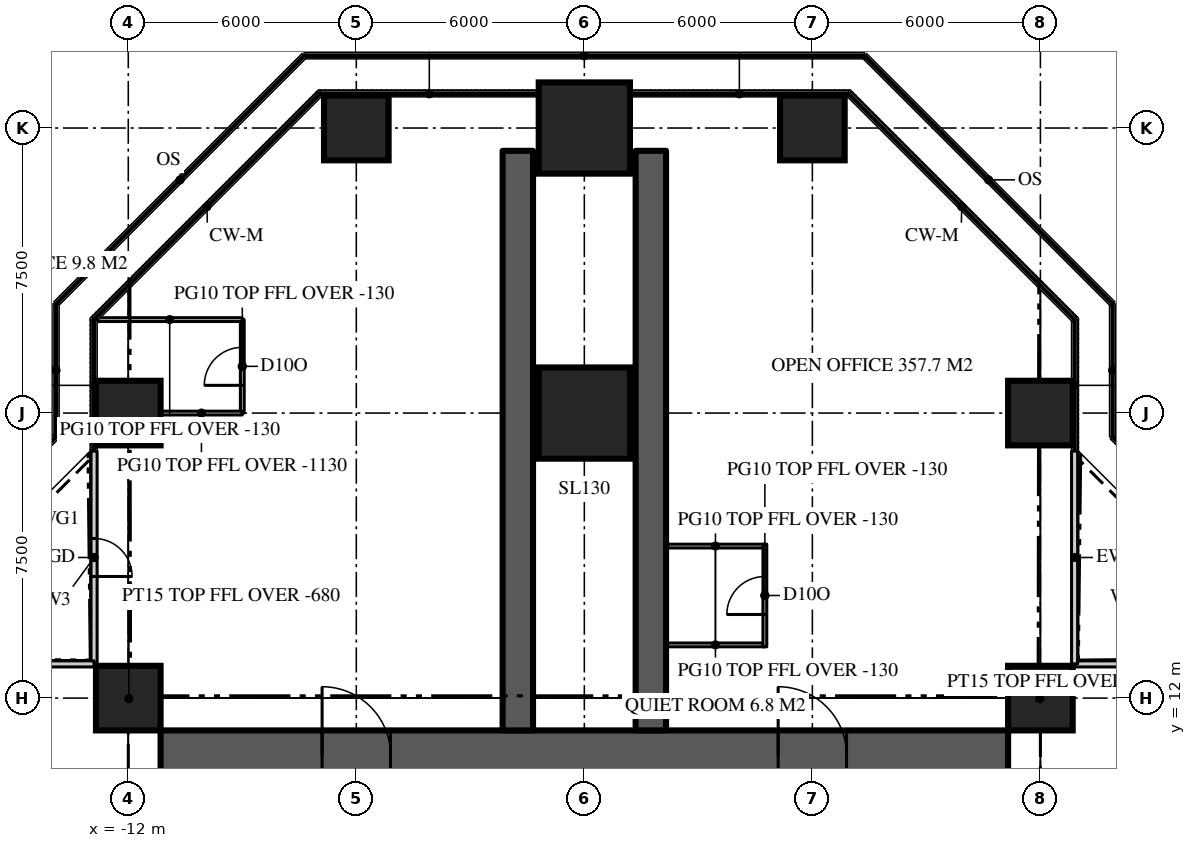
"""IFC4 building model, lengths in metres.
Left out: names, types, materials, properties, quantities, classifications, styles, units other than length and angle.
Written with IfcOpenShell. Run it as: python <this file> out.ifc"""

import sys

from ifc_helpers import new_model, si_unit, direction, frame, frame_2d, origin, origin_2d, place, context, subcontext, project, spatial, rectangle, extrude, element, fill, save


model = new_model("IFC4")
c1 = context("Model", 3, precision=1e-05, world=origin(), true_north=direction((0.0, 1.0)))
c2 = subcontext(c1, "Body", "Model", "MODEL_VIEW")
j1 = project(units=[si_unit("LENGTHUNIT", "METRE"), si_unit("PLANEANGLEUNIT", "RADIAN")], contexts=[c1])
p1 = place(None, origin())
s1 = spatial("IfcSite", under=j1, at=p1, CompositionType="ELEMENT")
p2 = place(p1, origin())
s2 = spatial("IfcBuilding", under=s1, at=p2, CompositionType="ELEMENT")
p3 = place(p2, frame((0.0, 0.0, 155.4)))
s3 = spatial("IfcBuildingStorey", under=s2, at=p3, CompositionType="ELEMENT", Elevation=155.4)
p4 = place(p3, frame((-11.15, 10.5, 0.0), z_axis=(0.0, 0.0, 1.0), x_axis=(1.0, 0.0, 0.0)))
e1 = element("IfcWall", 1, at=p4, inside=s3, PredefinedType="SHEAR", context=c2, shape_type="SweptSolid", body=[
    extrude(rectangle(XDim=22.3, YDim=1.3, at=frame_2d((11.15, 0.0))), origin(), (0.0, 0.0, 1.0), 3.9),
])
p5 = place(p4, frame((4.25, 0.0, 0.0)))
e2 = element("IfcOpeningElement", 2, at=p5, cuts=e1, PredefinedType="OPENING", context=c2, shape_type="SweptSolid", body=[
    extrude(rectangle(XDim=1.8, YDim=2.2, at=frame_2d((0.9, 1.1))), frame((0.0, 0.66, 0.0), z_axis=(0.0, -1.0, 0.0), x_axis=(1.0, 0.0, 0.0)), (0.0, 0.0, 1.0), 1.32),
])
p6 = place(p4, frame((16.25, 0.0, 0.0)))
e3 = element("IfcOpeningElement", 3, at=p6, cuts=e1, PredefinedType="OPENING", context=c2, shape_type="SweptSolid", body=[
    extrude(rectangle(XDim=1.8, YDim=2.2, at=frame_2d((0.9, 1.1))), frame((0.0, 0.66, 0.0), z_axis=(0.0, -1.0, 0.0), x_axis=(1.0, 0.0, 0.0)), (0.0, 0.0, 1.0), 1.32),
])
for number, where, z_axis, x_axis in (
    (4, (1.75, 11.15, 0.0), (0.0, 0.0, 1.0), (0.0, 1.0, 0.0)),
    (5, (-1.75, 11.15, 0.0), (0.0, 0.0, 1.0), (0.0, 1.0, 0.0)),
):
    element("IfcWall", number, at=place(p3, frame(where, z_axis=z_axis, x_axis=x_axis)), inside=s3, PredefinedType="SHEAR", context=c2, shape_type="SweptSolid", body=[
        extrude(rectangle(XDim=15.25, YDim=0.8, at=frame_2d((7.625, 0.0))), origin(), (0.0, 0.0, 1.0), 3.9),
    ])
for number, where, z_axis, x_axis in (
    (6, (-12.0, 12.0, 0.0), (0.0, 0.0, 1.0), (1.0, 0.0, 0.0)),
    (7, (12.0, 12.0, 0.0), (0.0, 0.0, 1.0), (1.0, 0.0, 0.0)),
    (8, (-12.0, 19.5, 0.0), (0.0, 0.0, 1.0), (1.0, 0.0, 0.0)),
):
    element("IfcColumn", number, at=place(p3, frame(where, z_axis=z_axis, x_axis=x_axis)), inside=s3, PredefinedType="COLUMN", context=c2, shape_type="SweptSolid", body=[
        extrude(rectangle(XDim=1.7, YDim=1.7, at=origin_2d()), origin(), (0.0, 0.0, 1.0), 3.9),
    ])
p7 = place(p3, frame((0.0, 19.5, 0.0), z_axis=(0.0, 0.0, 1.0), x_axis=(1.0, 0.0, 0.0)))
e9 = element("IfcColumn", 9, at=p7, inside=s3, PredefinedType="COLUMN", context=c2, shape_type="SweptSolid", body=[
    extrude(rectangle(XDim=2.4, YDim=2.4, at=origin_2d()), origin(), (0.0, 0.0, 1.0), 3.9),
])
for number, where, z_axis, x_axis in (
    (10, (12.0, 19.5, 0.0), (0.0, 0.0, 1.0), (1.0, 0.0, 0.0)),
    (11, (-6.0, 27.0, 0.0), (0.0, 0.0, 1.0), (1.0, 0.0, 0.0)),
):
    element("IfcColumn", number, at=place(p3, frame(where, z_axis=z_axis, x_axis=x_axis)), inside=s3, PredefinedType="COLUMN", context=c2, shape_type="SweptSolid", body=[
        extrude(rectangle(XDim=1.7, YDim=1.7, at=origin_2d()), origin(), (0.0, 0.0, 1.0), 3.9),
    ])
p8 = place(p3, frame((0.0, 27.0, 0.0), z_axis=(0.0, 0.0, 1.0), x_axis=(1.0, 0.0, 0.0)))
e12 = element("IfcColumn", 12, at=p8, inside=s3, PredefinedType="COLUMN", context=c2, shape_type="SweptSolid", body=[
    extrude(rectangle(XDim=2.4, YDim=2.4, at=origin_2d()), origin(), (0.0, 0.0, 1.0), 3.9),
])
p9 = place(p3, frame((6.0, 27.0, 0.0), z_axis=(0.0, 0.0, 1.0), x_axis=(1.0, 0.0, 0.0)))
e13 = element("IfcColumn", 13, at=p9, inside=s3, PredefinedType="COLUMN", context=c2, shape_type="SweptSolid", body=[
    extrude(rectangle(XDim=1.7, YDim=1.7, at=origin_2d()), origin(), (0.0, 0.0, 1.0), 3.9),
])
p10 = place(p3, frame((18.5, 12.9, 0.0), z_axis=(0.0, 0.0, 1.0), x_axis=(-1.0, 0.0, 0.0)))
e14 = element("IfcWall", 14, at=p10, inside=s3, PredefinedType="SOLIDWALL", context=c2, shape_type="SweptSolid", body=[
    extrude(rectangle(XDim=5.6, YDim=0.16, at=frame_2d((2.8, 0.0))), origin(), (0.0, 0.0, 1.0), 3.77),
])
p11 = place(p10, frame((2.3, 0.0, 0.0)))
e15 = element("IfcOpeningElement", 15, at=p11, cuts=e14, PredefinedType="OPENING", context=c2, shape_type="SweptSolid", body=[
    extrude(rectangle(XDim=1.0, YDim=2.2, at=frame_2d((0.5, 1.1))), frame((0.0, 0.09, 0.0), z_axis=(0.0, -1.0, 0.0), x_axis=(1.0, 0.0, 0.0)), (0.0, 0.0, 1.0), 0.18),
])
p12 = place(p3, frame((12.9, 12.9, 0.0), z_axis=(0.0, 0.0, 1.0), x_axis=(0.0, 1.0, 0.0)))
e16 = element("IfcWall", 16, at=p12, inside=s3, PredefinedType="SOLIDWALL", context=c2, shape_type="SweptSolid", body=[
    extrude(rectangle(XDim=5.6, YDim=0.16, at=frame_2d((2.8, 0.0))), origin(), (0.0, 0.0, 1.0), 3.77),
])
p13 = place(p3, frame((-12.9, 18.5, 0.0), z_axis=(0.0, 0.0, 1.0), x_axis=(0.0, -1.0, 0.0)))
e17 = element("IfcWall", 17, at=p13, inside=s3, PredefinedType="SOLIDWALL", context=c2, shape_type="SweptSolid", body=[
    extrude(rectangle(XDim=5.6, YDim=0.16, at=frame_2d((2.8, 0.0))), origin(), (0.0, 0.0, 1.0), 3.77),
])
p14 = place(p13, frame((2.3, 0.0, 0.0)))
e18 = element("IfcOpeningElement", 18, at=p14, cuts=e17, PredefinedType="OPENING", context=c2, shape_type="SweptSolid", body=[
    extrude(rectangle(XDim=1.0, YDim=2.2, at=frame_2d((0.5, 1.1))), frame((0.0, 0.09, 0.0), z_axis=(0.0, -1.0, 0.0), x_axis=(1.0, 0.0, 0.0)), (0.0, 0.0, 1.0), 0.18),
])
p15 = place(p3, frame((-12.9, 12.9, 0.0), z_axis=(0.0, 0.0, 1.0), x_axis=(-1.0, 0.0, 0.0)))
e19 = element("IfcWall", 19, at=p15, inside=s3, PredefinedType="SOLIDWALL", context=c2, shape_type="SweptSolid", body=[
    extrude(rectangle(XDim=5.6, YDim=0.16, at=frame_2d((2.8, 0.0))), origin(), (0.0, 0.0, 1.0), 3.77),
])
p16 = place(p3, frame((-9.0, 19.5, 0.0), z_axis=(0.0, 0.0, 1.0), x_axis=(0.0, 1.0, 0.0)))
e20 = element("IfcWall", 20, at=p16, inside=s3, PredefinedType="PARTITIONING", context=c2, shape_type="SweptSolid", body=[
    extrude(rectangle(XDim=2.459, YDim=0.1, at=frame_2d((1.229, 0.0))), origin(), (0.0, 0.0, 1.0), 3.77),
])
p17 = place(p16, frame((0.729, 0.0, 0.0)))
e21 = element("IfcOpeningElement", 21, at=p17, cuts=e20, PredefinedType="OPENING", context=c2, shape_type="SweptSolid", body=[
    extrude(rectangle(XDim=1.0, YDim=2.2, at=frame_2d((0.5, 1.1))), frame((0.0, 0.06, 0.0), z_axis=(0.0, -1.0, 0.0), x_axis=(1.0, 0.0, 0.0)), (0.0, 0.0, 1.0), 0.12),
])
p18 = place(p3, frame((-9.0, 19.5, 0.0), z_axis=(0.0, 0.0, 1.0), x_axis=(-1.0, 0.0, 0.0)))
e22 = element("IfcWall", 22, at=p18, inside=s3, PredefinedType="PARTITIONING", context=c2, shape_type="SweptSolid", body=[
    extrude(rectangle(XDim=2.15, YDim=0.1, at=frame_2d((1.075, 0.0))), origin(), (0.0, 0.0, 1.0), 2.77),
])
p19 = place(p3, frame((-9.0, 21.959, 0.0), z_axis=(0.0, 0.0, 1.0), x_axis=(-1.0, 0.0, 0.0)))
e23 = element("IfcWall", 23, at=p19, inside=s3, PredefinedType="PARTITIONING", context=c2, shape_type="SweptSolid", body=[
    extrude(rectangle(XDim=3.82, YDim=0.1, at=frame_2d((1.91, 0.0))), origin(), (0.0, 0.0, 1.0), 3.77),
])
for number, where, z_axis, x_axis in (
    (24, (2.15, 13.4, 0.0), (0.0, 0.0, 1.0), (1.0, 0.0, 0.0)),
    (25, (2.15, 16.0, 0.0), (0.0, 0.0, 1.0), (1.0, 0.0, 0.0)),
):
    element("IfcWall", number, at=place(p3, frame(where, z_axis=z_axis, x_axis=x_axis)), inside=s3, PredefinedType="PARTITIONING", context=c2, shape_type="SweptSolid", body=[
        extrude(rectangle(XDim=2.6, YDim=0.1, at=frame_2d((1.3, 0.0))), origin(), (0.0, 0.0, 1.0), 3.77),
    ])
p20 = place(p3, frame((4.75, 13.35, 0.0), z_axis=(0.0, 0.0, 1.0), x_axis=(0.0, 1.0, 0.0)))
e26 = element("IfcWall", 26, at=p20, inside=s3, PredefinedType="PARTITIONING", context=c2, shape_type="SweptSolid", body=[
    extrude(rectangle(XDim=2.7, YDim=0.1, at=frame_2d((1.35, 0.0))), origin(), (0.0, 0.0, 1.0), 3.77),
])
p21 = place(p20, frame((0.85, 0.0, 0.0)))
e27 = element("IfcOpeningElement", 27, at=p21, cuts=e26, PredefinedType="OPENING", context=c2, shape_type="SweptSolid", body=[
    extrude(rectangle(XDim=1.0, YDim=2.2, at=frame_2d((0.5, 1.1))), frame((0.0, 0.06, 0.0), z_axis=(0.0, -1.0, 0.0), x_axis=(1.0, 0.0, 0.0)), (0.0, 0.0, 1.0), 0.12),
])
for number, where, z_axis, x_axis in (
    (28, (11.15, 11.15, 0.0), (0.0, 0.0, 1.0), (0.707, 0.707, 0.0)),
    (29, (-11.15, 11.15, 0.0), (0.0, 0.0, 1.0), (-0.707, 0.707, 0.0)),
):
    element("IfcWall", number, at=place(p3, frame(where, z_axis=z_axis, x_axis=x_axis)), inside=s3, PredefinedType="PARTITIONING", context=c2, shape_type="SweptSolid", body=[
        extrude(rectangle(XDim=2.362, YDim=0.15, at=frame_2d((1.181, 0.0))), origin(), (0.0, 0.0, 1.0), 3.22),
    ])
p22 = place(p14, origin())
e30 = element("IfcDoor", 30, at=p22, inside=s3, OperationType="SINGLE_SWING_RIGHT", PredefinedType="DOOR", context=c2, shape_type="SweptSolid", body=[
    extrude(rectangle(XDim=1.0, YDim=2.2, at=frame_2d((0.5, 1.1))), frame((0.0, 0.025, 0.0), z_axis=(0.0, -1.0, 0.0), x_axis=(1.0, 0.0, 0.0)), (0.0, 0.0, 1.0), 0.05),
])
fill(e18, e30)
p23 = place(p5, origin())
e31 = element("IfcDoor", 31, at=p23, inside=s3, OperationType="DOUBLE_DOOR_DOUBLE_SWING", PredefinedType="DOOR", context=c2, shape_type="SweptSolid", body=[
    extrude(rectangle(XDim=1.8, YDim=2.2, at=frame_2d((0.9, 1.1))), frame((0.0, 0.025, 0.0), z_axis=(0.0, -1.0, 0.0), x_axis=(1.0, 0.0, 0.0)), (0.0, 0.0, 1.0), 0.05),
])
fill(e2, e31)
p24 = place(p6, origin())
e32 = element("IfcDoor", 32, at=p24, inside=s3, OperationType="DOUBLE_DOOR_DOUBLE_SWING", PredefinedType="DOOR", context=c2, shape_type="SweptSolid", body=[
    extrude(rectangle(XDim=1.8, YDim=2.2, at=frame_2d((0.9, 1.1))), frame((0.0, 0.025, 0.0), z_axis=(0.0, -1.0, 0.0), x_axis=(1.0, 0.0, 0.0)), (0.0, 0.0, 1.0), 0.05),
])
fill(e3, e32)
p25 = place(p17, origin())
e33 = element("IfcDoor", 33, at=p25, inside=s3, OperationType="SINGLE_SWING_LEFT", PredefinedType="DOOR", context=c2, shape_type="SweptSolid", body=[
    extrude(rectangle(XDim=1.0, YDim=2.2, at=frame_2d((0.5, 1.1))), frame((0.0, 0.025, 0.0), z_axis=(0.0, -1.0, 0.0), x_axis=(1.0, 0.0, 0.0)), (0.0, 0.0, 1.0), 0.05),
])
fill(e21, e33)
p26 = place(p21, origin())
e34 = element("IfcDoor", 34, at=p26, inside=s3, OperationType="SINGLE_SWING_LEFT", PredefinedType="DOOR", context=c2, shape_type="SweptSolid", body=[
    extrude(rectangle(XDim=1.0, YDim=2.2, at=frame_2d((0.5, 1.1))), frame((0.0, 0.025, 0.0), z_axis=(0.0, -1.0, 0.0), x_axis=(1.0, 0.0, 0.0)), (0.0, 0.0, 1.0), 0.05),
])
fill(e27, e34)
save(model, sys.argv[1])
